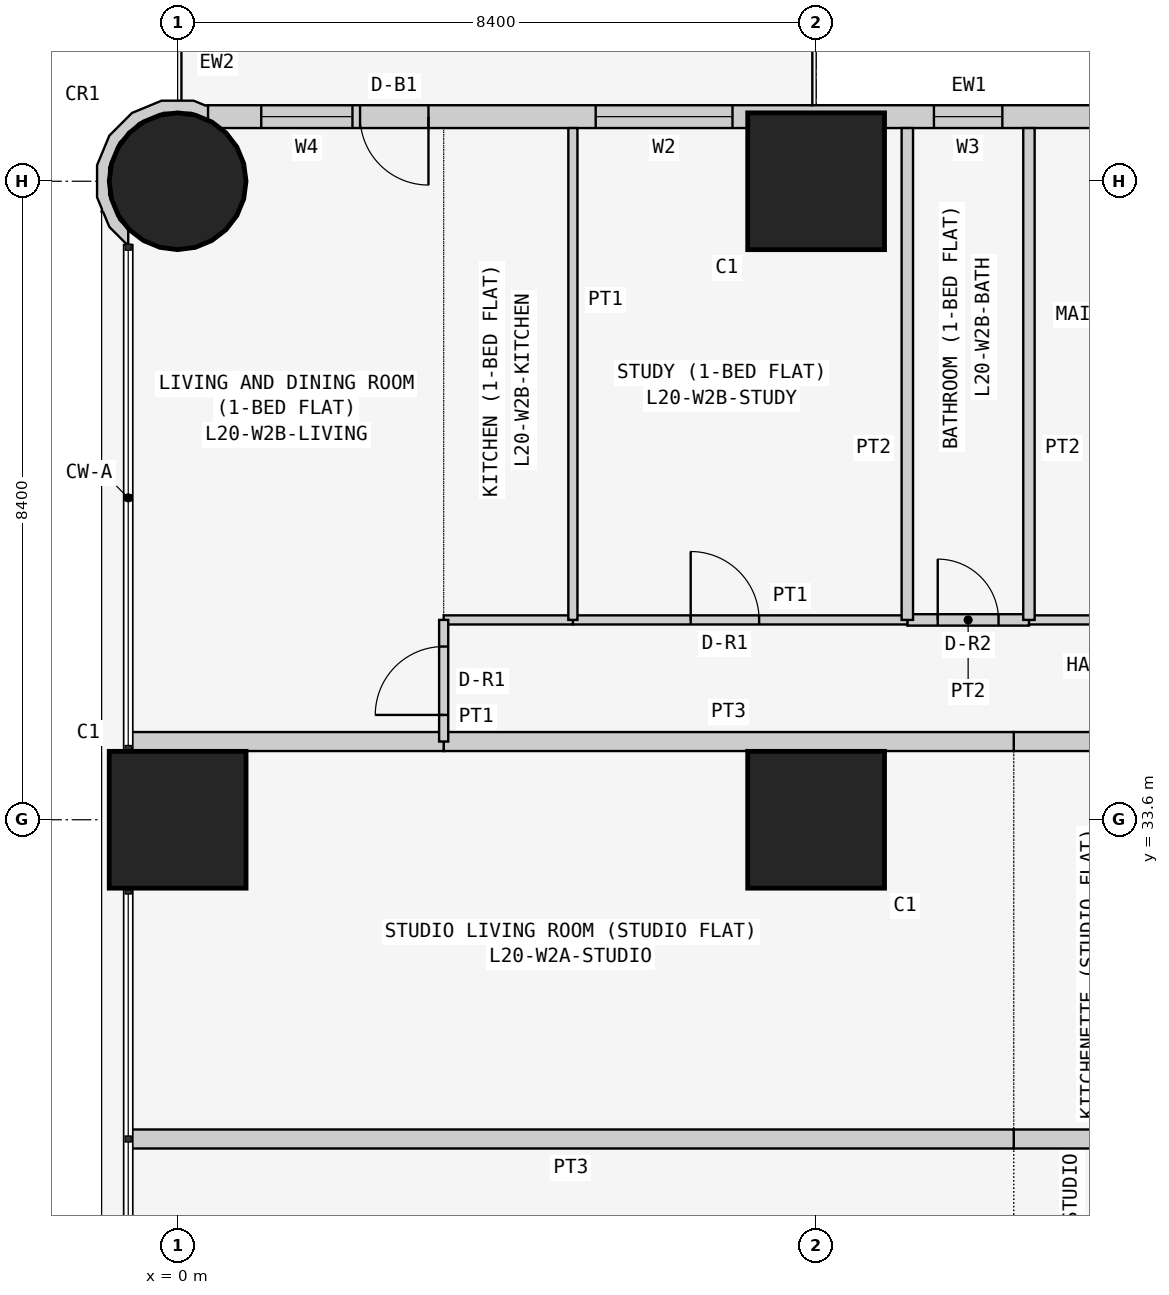
"""IFC4 building model, lengths in metres.
Left out: names, types, materials, properties, quantities, classifications, styles, units other than length and angle.
Written with IfcOpenShell. Run it as: python <this file> out.ifc"""

import sys

from ifc_helpers import new_model, si_unit, direction, frame, frame_2d, origin, origin_2d, place, context, subcontext, project, spatial, polyline, rectangle, circle, outline, extrude, element, fill, save


model = new_model("IFC4")
c1 = context("Model", 3, precision=1e-05, world=origin(), true_north=direction((0.0, 1.0)))
c2 = subcontext(c1, "Body", "Model", "MODEL_VIEW")
j1 = project(units=[si_unit("LENGTHUNIT", "METRE"), si_unit("PLANEANGLEUNIT", "RADIAN")], contexts=[c1])
p1 = place(None, origin())
s1 = spatial("IfcSite", under=j1, at=p1, CompositionType="ELEMENT")
p2 = place(p1, origin())
s2 = spatial("IfcBuilding", under=s1, at=p2, CompositionType="ELEMENT")
p3 = place(p2, frame((0.0, 0.0, 81.3)))
s3 = spatial("IfcBuildingStorey", under=s2, at=p3, CompositionType="ELEMENT", Elevation=81.3)
p4 = place(p3, frame((0.0, 33.6, 0.0), z_axis=(0.0, 0.0, 1.0), x_axis=(1.0, 0.0, 0.0)))
e1 = element("IfcColumn", 1, at=p4, inside=s3, PredefinedType="COLUMN", context=c2, shape_type="SweptSolid", body=[
    extrude(rectangle(XDim=1.8, YDim=1.8, at=origin_2d()), origin(), (0.0, 0.0, 1.0), 3.6),
])
p5 = place(p3, frame((0.0, 42.0, 0.0), z_axis=(0.0, 0.0, 1.0), x_axis=(1.0, 0.0, 0.0)))
e2 = element("IfcColumn", 2, at=p5, inside=s3, PredefinedType="COLUMN", context=c2, shape_type="SweptSolid", body=[
    extrude(circle(Radius=0.9, at=origin_2d()), origin(), (0.0, 0.0, 1.0), 3.6),
])
for number, where, z_axis, x_axis in (
    (3, (8.4, 33.6, 0.0), (0.0, 0.0, 1.0), (1.0, 0.0, 0.0)),
    (4, (8.4, 42.0, 0.0), (0.0, 0.0, 1.0), (1.0, 0.0, 0.0)),
):
    element("IfcColumn", number, at=place(p3, frame(where, z_axis=z_axis, x_axis=x_axis)), inside=s3, PredefinedType="COLUMN", context=c2, shape_type="SweptSolid", body=[
        extrude(rectangle(XDim=1.8, YDim=1.8, at=origin_2d()), origin(), (0.0, 0.0, 1.0), 3.6),
    ])
p6 = place(p3, frame((15.8, 42.85, 0.0), z_axis=(0.0, 0.0, 1.0), x_axis=(-1.0, 0.0, 0.0)))
e5 = element("IfcWall", 5, at=p6, inside=s3, PredefinedType="SOLIDWALL", context=c2, shape_type="SweptSolid", body=[
    extrude(rectangle(XDim=15.4, YDim=0.3, at=frame_2d((7.7, 0.0))), origin(), (0.0, 0.0, 1.0), 3.45),
])
p7 = place(p6, frame((1.2, 0.0, 0.9)))
e6 = element("IfcOpeningElement", 6, at=p7, cuts=e5, PredefinedType="OPENING", context=c2, shape_type="SweptSolid", body=[
    extrude(rectangle(XDim=1.8, YDim=1.5, at=frame_2d((0.9, 0.75))), frame((0.0, 0.16, 0.0), z_axis=(0.0, -1.0, 0.0), x_axis=(1.0, 0.0, 0.0)), (0.0, 0.0, 1.0), 0.32),
])
p8 = place(p6, frame((4.95, 0.0, 1.5)))
e7 = element("IfcOpeningElement", 7, at=p8, cuts=e5, PredefinedType="OPENING", context=c2, shape_type="SweptSolid", body=[
    extrude(rectangle(XDim=0.9, YDim=0.7, at=frame_2d((0.45, 0.35))), frame((0.0, 0.16, 0.0), z_axis=(0.0, -1.0, 0.0), x_axis=(1.0, 0.0, 0.0)), (0.0, 0.0, 1.0), 0.32),
])
p9 = place(p6, frame((8.5, 0.0, 0.9)))
e8 = element("IfcOpeningElement", 8, at=p9, cuts=e5, PredefinedType="OPENING", context=c2, shape_type="SweptSolid", body=[
    extrude(rectangle(XDim=1.8, YDim=1.5, at=frame_2d((0.9, 0.75))), frame((0.0, 0.16, 0.0), z_axis=(0.0, -1.0, 0.0), x_axis=(1.0, 0.0, 0.0)), (0.0, 0.0, 1.0), 0.32),
])
p10 = place(p6, frame((12.5, 0.0, 0.0)))
e9 = element("IfcOpeningElement", 9, at=p10, cuts=e5, PredefinedType="OPENING", context=c2, shape_type="SweptSolid", body=[
    extrude(rectangle(XDim=0.9, YDim=2.4, at=frame_2d((0.45, 1.2))), frame((0.0, 0.16, 0.0), z_axis=(0.0, -1.0, 0.0), x_axis=(1.0, 0.0, 0.0)), (0.0, 0.0, 1.0), 0.32),
])
p11 = place(p6, frame((13.5, 0.0, 0.9)))
e10 = element("IfcOpeningElement", 10, at=p11, cuts=e5, PredefinedType="OPENING", context=c2, shape_type="SweptSolid", body=[
    extrude(rectangle(XDim=1.2, YDim=1.5, at=frame_2d((0.6, 0.75))), frame((0.0, 0.16, 0.0), z_axis=(0.0, -1.0, 0.0), x_axis=(1.0, 0.0, 0.0)), (0.0, 0.0, 1.0), 0.32),
])
p12 = place(p3, frame((0.364, 42.91, 0.0), z_axis=(0.0, 0.0, 1.0), x_axis=(-0.926129809145, 0.377204953059, 0.0)))
e11 = element("IfcWall", 11, at=p12, inside=s3, PredefinedType="SOLIDWALL", context=c2, shape_type="SweptSolid", body=[
    extrude(outline(polyline([(0.36, 1.803), (0.509, 1.741), (0.761, 1.486), (0.896, 1.154), (0.894, 0.795), (0.755, 0.465), (0.5, 0.213), (0.168, 0.078), (-0.1, 0.08), (0.001, -0.097), (0.03, -0.08), (0.199, -0.081), (0.589, 0.078), (0.889, 0.374), (1.053, 0.763), (1.055, 1.185), (0.896, 1.575), (0.778, 1.695), (0.769, 1.728), (0.75, 1.723), (0.6, 1.875), (0.295, 2.003), (0.281, 1.998), (0.36, 1.803)])), origin(), (0.0, 0.0, 1.0), 3.45),
])
p13 = place(p3, frame((13.4, 29.4, 0.0), z_axis=(0.0, 0.0, 1.0), x_axis=(-1.0, 0.0, 0.0)))
e12 = element("IfcWall", 12, at=p13, inside=s3, PredefinedType="PARTITIONING", context=c2, shape_type="SweptSolid", body=[
    extrude(rectangle(XDim=2.4, YDim=0.25, at=frame_2d((1.2, 0.0))), origin(), (0.0, 0.0, 1.0), 3.45),
])
p14 = place(p3, frame((11.0, 29.4, 0.0), z_axis=(0.0, 0.0, 1.0), x_axis=(-1.0, 0.0, 0.0)))
e13 = element("IfcWall", 13, at=p14, inside=s3, PredefinedType="PARTITIONING", context=c2, shape_type="SweptSolid", body=[
    extrude(rectangle(XDim=11.65, YDim=0.25, at=frame_2d((5.825, 0.0))), origin(), (0.0, 0.0, 1.0), 3.45),
])
p15 = place(p3, frame((11.0, 34.629, 0.0), z_axis=(0.0, 0.0, 1.0), x_axis=(1.0, 0.0, 0.0)))
e14 = element("IfcWall", 14, at=p15, inside=s3, PredefinedType="PARTITIONING", context=c2, shape_type="SweptSolid", body=[
    extrude(rectangle(XDim=2.4, YDim=0.25, at=frame_2d((1.2, 0.0))), origin(), (0.0, 0.0, 1.0), 3.45),
])
p16 = place(p3, frame((3.5, 34.629, 0.0), z_axis=(0.0, 0.0, 1.0), x_axis=(1.0, 0.0, 0.0)))
e15 = element("IfcWall", 15, at=p16, inside=s3, PredefinedType="PARTITIONING", context=c2, shape_type="SweptSolid", body=[
    extrude(rectangle(XDim=7.5, YDim=0.25, at=frame_2d((3.75, 0.0))), origin(), (0.0, 0.0, 1.0), 3.45),
])
p17 = place(p3, frame((-0.65, 34.629, 0.0), z_axis=(0.0, 0.0, 1.0), x_axis=(1.0, 0.0, 0.0)))
e16 = element("IfcWall", 16, at=p17, inside=s3, PredefinedType="PARTITIONING", context=c2, shape_type="SweptSolid", body=[
    extrude(rectangle(XDim=4.15, YDim=0.25, at=frame_2d((2.075, 0.0))), origin(), (0.0, 0.0, 1.0), 3.45),
])
p18 = place(p3, frame((11.2, 36.229, 0.0), z_axis=(0.0, 0.0, 1.0), x_axis=(1.0, 0.0, 0.0)))
e17 = element("IfcWall", 17, at=p18, inside=s3, PredefinedType="PARTITIONING", context=c2, shape_type="SweptSolid", body=[
    extrude(rectangle(XDim=4.575, YDim=0.12, at=frame_2d((2.288, 0.0))), origin(), (0.0, 0.0, 1.0), 3.45),
])
p19 = place(p18, frame((1.85, 0.0, 0.0)))
e18 = element("IfcOpeningElement", 18, at=p19, cuts=e17, PredefinedType="OPENING", context=c2, shape_type="SweptSolid", body=[
    extrude(rectangle(XDim=0.9, YDim=2.1, at=frame_2d((0.45, 1.05))), frame((0.0, 0.07, 0.0), z_axis=(0.0, -1.0, 0.0), x_axis=(1.0, 0.0, 0.0)), (0.0, 0.0, 1.0), 0.14),
])
p20 = place(p3, frame((9.6, 36.229, 0.0), z_axis=(0.0, 0.0, 1.0), x_axis=(1.0, 0.0, 0.0)))
e19 = element("IfcWall", 19, at=p20, inside=s3, PredefinedType="PARTITIONING", context=c2, shape_type="SweptSolid", body=[
    extrude(rectangle(XDim=1.6, YDim=0.15, at=frame_2d((0.8, 0.0))), origin(), (0.0, 0.0, 1.0), 3.45),
])
p21 = place(p20, frame((0.4, 0.0, 0.0)))
e20 = element("IfcOpeningElement", 20, at=p21, cuts=e19, PredefinedType="OPENING", context=c2, shape_type="SweptSolid", body=[
    extrude(rectangle(XDim=0.8, YDim=2.1, at=frame_2d((0.4, 1.05))), frame((0.0, 0.085, 0.0), z_axis=(0.0, -1.0, 0.0), x_axis=(1.0, 0.0, 0.0)), (0.0, 0.0, 1.0), 0.17),
])
p22 = place(p3, frame((5.2, 36.229, 0.0), z_axis=(0.0, 0.0, 1.0), x_axis=(1.0, 0.0, 0.0)))
e21 = element("IfcWall", 21, at=p22, inside=s3, PredefinedType="PARTITIONING", context=c2, shape_type="SweptSolid", body=[
    extrude(rectangle(XDim=4.4, YDim=0.12, at=frame_2d((2.2, 0.0))), origin(), (0.0, 0.0, 1.0), 3.45),
])
p23 = place(p22, frame((1.55, 0.0, 0.0)))
e22 = element("IfcOpeningElement", 22, at=p23, cuts=e21, PredefinedType="OPENING", context=c2, shape_type="SweptSolid", body=[
    extrude(rectangle(XDim=0.9, YDim=2.1, at=frame_2d((0.45, 1.05))), frame((0.0, 0.07, 0.0), z_axis=(0.0, -1.0, 0.0), x_axis=(1.0, 0.0, 0.0)), (0.0, 0.0, 1.0), 0.14),
])
p24 = place(p3, frame((3.5, 36.229, 0.0), z_axis=(0.0, 0.0, 1.0), x_axis=(1.0, 0.0, 0.0)))
e23 = element("IfcWall", 23, at=p24, inside=s3, PredefinedType="PARTITIONING", context=c2, shape_type="SweptSolid", body=[
    extrude(rectangle(XDim=1.7, YDim=0.12, at=frame_2d((0.85, 0.0))), origin(), (0.0, 0.0, 1.0), 3.45),
])
p25 = place(p3, frame((3.5, 34.629, 0.0), z_axis=(0.0, 0.0, 1.0), x_axis=(0.0, 1.0, 0.0)))
e24 = element("IfcWall", 24, at=p25, inside=s3, PredefinedType="PARTITIONING", context=c2, shape_type="SweptSolid", body=[
    extrude(rectangle(XDim=1.6, YDim=0.12, at=frame_2d((0.8, 0.0))), origin(), (0.0, 0.0, 1.0), 3.45),
])
p26 = place(p25, frame((0.35, 0.0, 0.0)))
e25 = element("IfcOpeningElement", 25, at=p26, cuts=e24, PredefinedType="OPENING", context=c2, shape_type="SweptSolid", body=[
    extrude(rectangle(XDim=0.9, YDim=2.1, at=frame_2d((0.45, 1.05))), frame((0.0, 0.07, 0.0), z_axis=(0.0, -1.0, 0.0), x_axis=(1.0, 0.0, 0.0)), (0.0, 0.0, 1.0), 0.14),
])
for number, where, z_axis, x_axis in (
    (26, (11.2, 36.229, 0.0), (0.0, 0.0, 1.0), (0.0, 1.0, 0.0)),
    (27, (9.6, 36.229, 0.0), (0.0, 0.0, 1.0), (0.0, 1.0, 0.0)),
):
    element("IfcWall", number, at=place(p3, frame(where, z_axis=z_axis, x_axis=x_axis)), inside=s3, PredefinedType="PARTITIONING", context=c2, shape_type="SweptSolid", body=[
        extrude(rectangle(XDim=6.471, YDim=0.15, at=frame_2d((3.235, 0.0))), origin(), (0.0, 0.0, 1.0), 3.45),
    ])
p27 = place(p3, frame((5.2, 36.229, 0.0), z_axis=(0.0, 0.0, 1.0), x_axis=(0.0, 1.0, 0.0)))
e28 = element("IfcWall", 28, at=p27, inside=s3, PredefinedType="PARTITIONING", context=c2, shape_type="SweptSolid", body=[
    extrude(rectangle(XDim=6.471, YDim=0.12, at=frame_2d((3.235, 0.0))), origin(), (0.0, 0.0, 1.0), 3.45),
])
p28 = place(p8, origin())
e29 = element("IfcWindow", 29, at=p28, inside=s3, PartitioningType="SINGLE_PANEL", PredefinedType="WINDOW", context=c2, shape_type="SweptSolid", body=[
    extrude(rectangle(XDim=0.9, YDim=0.7, at=frame_2d((0.45, 0.35))), frame((0.0, 0.03, 0.0), z_axis=(0.0, -1.0, 0.0), x_axis=(1.0, 0.0, 0.0)), (0.0, 0.0, 1.0), 0.06),
])
fill(e7, e29)
p29 = place(p9, origin())
e30 = element("IfcWindow", 30, at=p29, inside=s3, PartitioningType="SINGLE_PANEL", PredefinedType="WINDOW", context=c2, shape_type="SweptSolid", body=[
    extrude(rectangle(XDim=1.8, YDim=1.5, at=frame_2d((0.9, 0.75))), frame((0.0, 0.03, 0.0), z_axis=(0.0, -1.0, 0.0), x_axis=(1.0, 0.0, 0.0)), (0.0, 0.0, 1.0), 0.06),
])
fill(e8, e30)
p30 = place(p10, origin())
e31 = element("IfcDoor", 31, at=p30, inside=s3, OperationType="SINGLE_SWING_LEFT", PredefinedType="DOOR", context=c2, shape_type="SweptSolid", body=[
    extrude(rectangle(XDim=0.9, YDim=2.4, at=frame_2d((0.45, 1.2))), frame((0.0, 0.025, 0.0), z_axis=(0.0, -1.0, 0.0), x_axis=(1.0, 0.0, 0.0)), (0.0, 0.0, 1.0), 0.05),
])
fill(e9, e31)
p31 = place(p11, origin())
e32 = element("IfcWindow", 32, at=p31, inside=s3, PartitioningType="SINGLE_PANEL", PredefinedType="WINDOW", context=c2, shape_type="SweptSolid", body=[
    extrude(rectangle(XDim=1.2, YDim=1.5, at=frame_2d((0.6, 0.75))), frame((0.0, 0.03, 0.0), z_axis=(0.0, -1.0, 0.0), x_axis=(1.0, 0.0, 0.0)), (0.0, 0.0, 1.0), 0.06),
])
fill(e10, e32)
p32 = place(p21, origin())
e33 = element("IfcDoor", 33, at=p32, inside=s3, OperationType="SINGLE_SWING_LEFT", PredefinedType="DOOR", context=c2, shape_type="SweptSolid", body=[
    extrude(rectangle(XDim=0.8, YDim=2.1, at=frame_2d((0.4, 1.05))), frame((0.0, 0.025, 0.0), z_axis=(0.0, -1.0, 0.0), x_axis=(1.0, 0.0, 0.0)), (0.0, 0.0, 1.0), 0.05),
])
fill(e20, e33)
p33 = place(p23, origin())
e34 = element("IfcDoor", 34, at=p33, inside=s3, OperationType="SINGLE_SWING_LEFT", PredefinedType="DOOR", context=c2, shape_type="SweptSolid", body=[
    extrude(rectangle(XDim=0.9, YDim=2.1, at=frame_2d((0.45, 1.05))), frame((0.0, 0.025, 0.0), z_axis=(0.0, -1.0, 0.0), x_axis=(1.0, 0.0, 0.0)), (0.0, 0.0, 1.0), 0.05),
])
fill(e22, e34)
p34 = place(p26, origin())
e35 = element("IfcDoor", 35, at=p34, inside=s3, OperationType="SINGLE_SWING_LEFT", PredefinedType="DOOR", context=c2, shape_type="SweptSolid", body=[
    extrude(rectangle(XDim=0.9, YDim=2.1, at=frame_2d((0.45, 1.05))), frame((0.0, 0.025, 0.0), z_axis=(0.0, -1.0, 0.0), x_axis=(1.0, 0.0, 0.0)), (0.0, 0.0, 1.0), 0.05),
])
fill(e25, e35)
save(model, sys.argv[1])
